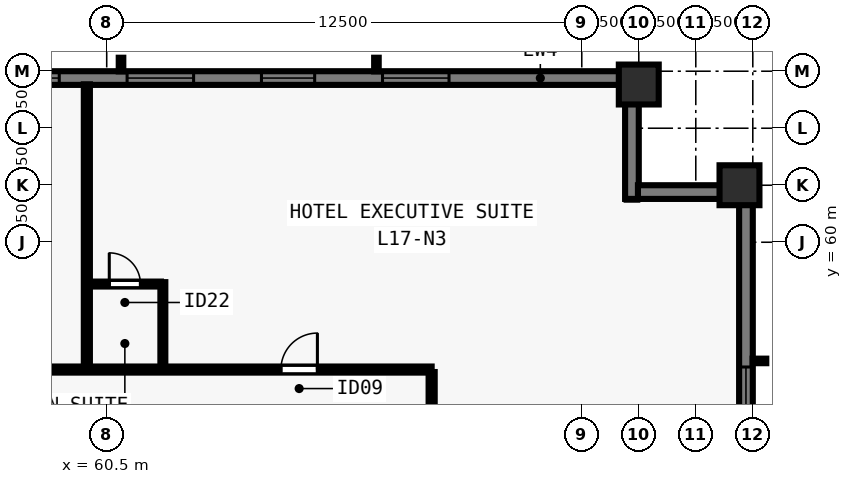
"""IFC4 building model, lengths in metres.
Left out: names, types, materials, properties, quantities, classifications, styles, units other than length and angle.
Written with IfcOpenShell. Run it as: python <this file> out.ifc"""

import sys

from ifc_helpers import new_model, si_unit, direction, frame, frame_2d, origin, origin_2d, place, context, subcontext, project, spatial, rectangle, extrude, element, fill, save


model = new_model("IFC4")
c1 = context("Model", 3, precision=1e-05, world=origin(), true_north=direction((0.0, 1.0)))
c2 = subcontext(c1, "Body", "Model", "MODEL_VIEW")
j1 = project(units=[si_unit("LENGTHUNIT", "METRE"), si_unit("PLANEANGLEUNIT", "RADIAN")], contexts=[c1])
p1 = place(None, origin())
s1 = spatial("IfcSite", under=j1, at=p1, CompositionType="ELEMENT")
p2 = place(p1, origin())
s2 = spatial("IfcBuilding", under=s1, at=p2, CompositionType="ELEMENT")
p3 = place(p2, frame((0.0, 0.0, 65.5)))
s3 = spatial("IfcBuildingStorey", under=s2, at=p3, CompositionType="ELEMENT", Elevation=65.5)
for number, where, z_axis, x_axis in (
    (1, (77.15, 61.5, 0.0), (0.0, 0.0, 1.0), (0.0, 1.0, 0.0)),
    (2, (74.5, 64.15, 0.0), (0.0, 0.0, 1.0), (1.0, 0.0, 0.0)),
):
    element("IfcColumn", number, at=place(p3, frame(where, z_axis=z_axis, x_axis=x_axis)), inside=s3, PredefinedType="COLUMN", context=c2, shape_type="SweptSolid", body=[
        extrude(rectangle(XDim=1.05, YDim=1.05, at=origin_2d()), origin(), (0.0, 0.0, 1.0), 3.5),
    ])
p4 = place(p3, frame((29.5, 64.32, 0.0), z_axis=(0.0, 0.0, 1.0), x_axis=(1.0, 0.0, 0.0)))
e3 = element("IfcWall", 3, at=p4, inside=s3, PredefinedType="SOLIDWALL", context=c2, shape_type="SweptSolid", body=[
    extrude(rectangle(XDim=44.662, YDim=0.36, at=frame_2d((22.331, 0.0))), origin(), (0.0, 0.0, 1.0), 3.28),
])
p5 = place(p4, frame((4.655, 0.0, 0.8)))
e4 = element("IfcOpeningElement", 4, at=p5, cuts=e3, PredefinedType="OPENING", context=c2, shape_type="SweptSolid", body=[
    extrude(rectangle(XDim=1.75, YDim=1.544, at=frame_2d((0.875, 0.772))), frame((0.0, 0.19, 0.0), z_axis=(0.0, -1.0, 0.0), x_axis=(1.0, 0.0, 0.0)), (0.0, 0.0, 1.0), 0.38),
])
p6 = place(p4, frame((8.19, 0.0, 0.8)))
e5 = element("IfcOpeningElement", 5, at=p6, cuts=e3, PredefinedType="OPENING", context=c2, shape_type="SweptSolid", body=[
    extrude(rectangle(XDim=1.4, YDim=1.544, at=frame_2d((0.7, 0.772))), frame((0.0, 0.19, 0.0), z_axis=(0.0, -1.0, 0.0), x_axis=(1.0, 0.0, 0.0)), (0.0, 0.0, 1.0), 0.38),
])
p7 = place(p4, frame((11.375, 0.0, 0.8)))
e6 = element("IfcOpeningElement", 6, at=p7, cuts=e3, PredefinedType="OPENING", context=c2, shape_type="SweptSolid", body=[
    extrude(rectangle(XDim=1.75, YDim=1.544, at=frame_2d((0.875, 0.772))), frame((0.0, 0.19, 0.0), z_axis=(0.0, -1.0, 0.0), x_axis=(1.0, 0.0, 0.0)), (0.0, 0.0, 1.0), 0.38),
])
p8 = place(p4, frame((15.361, 0.0, 0.8)))
e7 = element("IfcOpeningElement", 7, at=p8, cuts=e3, PredefinedType="OPENING", context=c2, shape_type="SweptSolid", body=[
    extrude(rectangle(XDim=1.4, YDim=1.544, at=frame_2d((0.7, 0.772))), frame((0.0, 0.19, 0.0), z_axis=(0.0, -1.0, 0.0), x_axis=(1.0, 0.0, 0.0)), (0.0, 0.0, 1.0), 0.38),
])
p9 = place(p4, frame((18.546, 0.0, 0.8)))
e8 = element("IfcOpeningElement", 8, at=p9, cuts=e3, PredefinedType="OPENING", context=c2, shape_type="SweptSolid", body=[
    extrude(rectangle(XDim=1.75, YDim=1.544, at=frame_2d((0.875, 0.772))), frame((0.0, 0.19, 0.0), z_axis=(0.0, -1.0, 0.0), x_axis=(1.0, 0.0, 0.0)), (0.0, 0.0, 1.0), 0.38),
])
p10 = place(p4, frame((21.631, 0.0, 0.8)))
e9 = element("IfcOpeningElement", 9, at=p10, cuts=e3, PredefinedType="OPENING", context=c2, shape_type="SweptSolid", body=[
    extrude(rectangle(XDim=1.4, YDim=1.544, at=frame_2d((0.7, 0.772))), frame((0.0, 0.19, 0.0), z_axis=(0.0, -1.0, 0.0), x_axis=(1.0, 0.0, 0.0)), (0.0, 0.0, 1.0), 0.38),
])
p11 = place(p4, frame((24.366, 0.0, 0.8)))
e10 = element("IfcOpeningElement", 10, at=p11, cuts=e3, PredefinedType="OPENING", context=c2, shape_type="SweptSolid", body=[
    extrude(rectangle(XDim=1.75, YDim=1.544, at=frame_2d((0.875, 0.772))), frame((0.0, 0.19, 0.0), z_axis=(0.0, -1.0, 0.0), x_axis=(1.0, 0.0, 0.0)), (0.0, 0.0, 1.0), 0.38),
])
p12 = place(p4, frame((28.351, 0.0, 0.8)))
e11 = element("IfcOpeningElement", 11, at=p12, cuts=e3, PredefinedType="OPENING", context=c2, shape_type="SweptSolid", body=[
    extrude(rectangle(XDim=1.4, YDim=1.544, at=frame_2d((0.7, 0.772))), frame((0.0, 0.19, 0.0), z_axis=(0.0, -1.0, 0.0), x_axis=(1.0, 0.0, 0.0)), (0.0, 0.0, 1.0), 0.38),
])
p13 = place(p4, frame((31.537, 0.0, 0.8)))
e12 = element("IfcOpeningElement", 12, at=p13, cuts=e3, PredefinedType="OPENING", context=c2, shape_type="SweptSolid", body=[
    extrude(rectangle(XDim=1.75, YDim=1.544, at=frame_2d((0.875, 0.772))), frame((0.0, 0.19, 0.0), z_axis=(0.0, -1.0, 0.0), x_axis=(1.0, 0.0, 0.0)), (0.0, 0.0, 1.0), 0.38),
])
p14 = place(p4, frame((35.072, 0.0, 0.8)))
e13 = element("IfcOpeningElement", 13, at=p14, cuts=e3, PredefinedType="OPENING", context=c2, shape_type="SweptSolid", body=[
    extrude(rectangle(XDim=1.4, YDim=1.544, at=frame_2d((0.7, 0.772))), frame((0.0, 0.19, 0.0), z_axis=(0.0, -1.0, 0.0), x_axis=(1.0, 0.0, 0.0)), (0.0, 0.0, 1.0), 0.38),
])
p15 = place(p4, frame((38.257, 0.0, 0.8)))
e14 = element("IfcOpeningElement", 14, at=p15, cuts=e3, PredefinedType="OPENING", context=c2, shape_type="SweptSolid", body=[
    extrude(rectangle(XDim=1.75, YDim=1.544, at=frame_2d((0.875, 0.772))), frame((0.0, 0.19, 0.0), z_axis=(0.0, -1.0, 0.0), x_axis=(1.0, 0.0, 0.0)), (0.0, 0.0, 1.0), 0.38),
])
p16 = place(p3, frame((74.32, 64.5, 0.0), z_axis=(0.0, 0.0, 1.0), x_axis=(0.0, -1.0, 0.0)))
e15 = element("IfcWall", 15, at=p16, inside=s3, PredefinedType="SOLIDWALL", context=c2, shape_type="SweptSolid", body=[
    extrude(rectangle(XDim=3.36, YDim=0.36, at=frame_2d((1.68, 0.0))), origin(), (0.0, 0.0, 1.0), 3.28),
])
p17 = place(p3, frame((74.478, 61.32, 0.0), z_axis=(0.0, 0.0, 1.0), x_axis=(1.0, 0.0, 0.0)))
e16 = element("IfcWall", 16, at=p17, inside=s3, PredefinedType="SOLIDWALL", context=c2, shape_type="SweptSolid", body=[
    extrude(rectangle(XDim=2.684, YDim=0.36, at=frame_2d((1.342, 0.0))), origin(), (0.0, 0.0, 1.0), 3.28),
])
p18 = place(p3, frame((77.32, 61.5, 0.0), z_axis=(0.0, 0.0, 1.0), x_axis=(0.0, -1.0, 0.0)))
e17 = element("IfcWall", 17, at=p18, inside=s3, PredefinedType="SOLIDWALL", context=c2, shape_type="SweptSolid", body=[
    extrude(rectangle(XDim=19.562, YDim=0.36, at=frame_2d((9.781, 0.0))), origin(), (0.0, 0.0, 1.0), 3.28),
])
p19 = place(p18, frame((4.783, 0.0, 0.8)))
e18 = element("IfcOpeningElement", 18, at=p19, cuts=e17, PredefinedType="OPENING", context=c2, shape_type="SweptSolid", body=[
    extrude(rectangle(XDim=1.75, YDim=1.544, at=frame_2d((0.875, 0.772))), frame((0.0, 0.19, 0.0), z_axis=(0.0, -1.0, 0.0), x_axis=(1.0, 0.0, 0.0)), (0.0, 0.0, 1.0), 0.38),
])
p20 = place(p18, frame((8.573, 0.0, 0.8)))
e19 = element("IfcOpeningElement", 19, at=p20, cuts=e17, PredefinedType="OPENING", context=c2, shape_type="SweptSolid", body=[
    extrude(rectangle(XDim=1.4, YDim=1.544, at=frame_2d((0.7, 0.772))), frame((0.0, 0.19, 0.0), z_axis=(0.0, -1.0, 0.0), x_axis=(1.0, 0.0, 0.0)), (0.0, 0.0, 1.0), 0.38),
])
p21 = place(p18, frame((12.014, 0.0, 0.8)))
e20 = element("IfcOpeningElement", 20, at=p21, cuts=e17, PredefinedType="OPENING", context=c2, shape_type="SweptSolid", body=[
    extrude(rectangle(XDim=1.75, YDim=1.544, at=frame_2d((0.875, 0.772))), frame((0.0, 0.19, 0.0), z_axis=(0.0, -1.0, 0.0), x_axis=(1.0, 0.0, 0.0)), (0.0, 0.0, 1.0), 0.38),
])
p22 = place(p18, frame((15.354, 0.0, 0.8)))
e21 = element("IfcOpeningElement", 21, at=p22, cuts=e17, PredefinedType="OPENING", context=c2, shape_type="SweptSolid", body=[
    extrude(rectangle(XDim=1.4, YDim=1.544, at=frame_2d((0.7, 0.772))), frame((0.0, 0.19, 0.0), z_axis=(0.0, -1.0, 0.0), x_axis=(1.0, 0.0, 0.0)), (0.0, 0.0, 1.0), 0.38),
])
p23 = place(p3, frame((34.95, 56.65, 0.0), z_axis=(0.0, 0.0, 1.0), x_axis=(1.0, 0.0, 0.0)))
e22 = element("IfcWall", 22, at=p23, inside=s3, PredefinedType="PARTITIONING", context=c2, shape_type="SweptSolid", body=[
    extrude(rectangle(XDim=34.1, YDim=0.16, at=frame_2d((17.05, 0.0))), origin(), (0.0, 0.0, 1.0), 3.28),
])
p24 = place(p23, frame((4.166, 0.0, 0.0)))
e23 = element("IfcOpeningElement", 23, at=p24, cuts=e22, PredefinedType="OPENING", context=c2, shape_type="SweptSolid", body=[
    extrude(rectangle(XDim=0.96, YDim=2.15, at=frame_2d((0.48, 1.075))), frame((0.0, 0.09, 0.0), z_axis=(0.0, -1.0, 0.0), x_axis=(1.0, 0.0, 0.0)), (0.0, 0.0, 1.0), 0.18),
])
p25 = place(p23, frame((17.73, 0.0, 0.0)))
e24 = element("IfcOpeningElement", 24, at=p25, cuts=e22, PredefinedType="OPENING", context=c2, shape_type="SweptSolid", body=[
    extrude(rectangle(XDim=0.96, YDim=2.15, at=frame_2d((0.48, 1.075))), frame((0.0, 0.09, 0.0), z_axis=(0.0, -1.0, 0.0), x_axis=(1.0, 0.0, 0.0)), (0.0, 0.0, 1.0), 0.18),
])
p26 = place(p23, frame((30.134, 0.0, 0.0)))
e25 = element("IfcOpeningElement", 25, at=p26, cuts=e22, PredefinedType="OPENING", context=c2, shape_type="SweptSolid", body=[
    extrude(rectangle(XDim=0.96, YDim=2.15, at=frame_2d((0.48, 1.075))), frame((0.0, 0.09, 0.0), z_axis=(0.0, -1.0, 0.0), x_axis=(1.0, 0.0, 0.0)), (0.0, 0.0, 1.0), 0.18),
])
p27 = place(p3, frame((69.05, 21.415, 0.0), z_axis=(0.0, 0.0, 1.0), x_axis=(0.0, 1.0, 0.0)))
e26 = element("IfcWall", 26, at=p27, inside=s3, PredefinedType="PARTITIONING", context=c2, shape_type="SweptSolid", body=[
    extrude(rectangle(XDim=35.17, YDim=0.16, at=frame_2d((17.585, 0.0))), origin(), (0.0, 0.0, 1.0), 3.28),
])
p28 = place(p27, frame((9.746, 0.0, 0.0)))
e27 = element("IfcOpeningElement", 27, at=p28, cuts=e26, PredefinedType="OPENING", context=c2, shape_type="SweptSolid", body=[
    extrude(rectangle(XDim=0.96, YDim=2.15, at=frame_2d((0.48, 1.075))), frame((0.0, 0.09, 0.0), z_axis=(0.0, -1.0, 0.0), x_axis=(1.0, 0.0, 0.0)), (0.0, 0.0, 1.0), 0.18),
])
p29 = place(p27, frame((27.146, 0.0, 0.0)))
e28 = element("IfcOpeningElement", 28, at=p29, cuts=e26, PredefinedType="OPENING", context=c2, shape_type="SweptSolid", body=[
    extrude(rectangle(XDim=0.96, YDim=2.15, at=frame_2d((0.48, 1.075))), frame((0.0, 0.09, 0.0), z_axis=(0.0, -1.0, 0.0), x_axis=(1.0, 0.0, 0.0)), (0.0, 0.0, 1.0), 0.18),
])
p30 = place(p3, frame((59.978, 56.715, 0.0), z_axis=(0.0, 0.0, 1.0), x_axis=(0.0, 1.0, 0.0)))
e29 = element("IfcWall", 29, at=p30, inside=s3, PredefinedType="PARTITIONING", context=c2, shape_type="SweptSolid", body=[
    extrude(rectangle(XDim=7.44, YDim=0.16, at=frame_2d((3.72, 0.0))), origin(), (0.0, 0.0, 1.0), 3.28),
])
p31 = place(p3, frame((61.978, 56.715, 0.0), z_axis=(0.0, 0.0, 1.0), x_axis=(0.0, 1.0, 0.0)))
e30 = element("IfcWall", 30, at=p31, inside=s3, PredefinedType="PLUMBINGWALL", context=c2, shape_type="SweptSolid", body=[
    extrude(rectangle(XDim=2.235, YDim=0.13, at=frame_2d((1.117, 0.0))), origin(), (0.0, 0.0, 1.0), 3.28),
])
p32 = place(p3, frame((60.042, 58.9, 0.0), z_axis=(0.0, 0.0, 1.0), x_axis=(1.0, 0.0, 0.0)))
e31 = element("IfcWall", 31, at=p32, inside=s3, PredefinedType="PLUMBINGWALL", context=c2, shape_type="SweptSolid", body=[
    extrude(rectangle(XDim=1.885, YDim=0.13, at=frame_2d((0.942, 0.0))), origin(), (0.0, 0.0, 1.0), 3.28),
])
p33 = place(p32, frame((0.525, 0.0, 0.0)))
e32 = element("IfcOpeningElement", 32, at=p33, cuts=e31, PredefinedType="OPENING", context=c2, shape_type="SweptSolid", body=[
    extrude(rectangle(XDim=0.82, YDim=2.1, at=frame_2d((0.41, 1.05))), frame((0.0, 0.075, 0.0), z_axis=(0.0, -1.0, 0.0), x_axis=(1.0, 0.0, 0.0)), (0.0, 0.0, 1.0), 0.15),
])
p34 = place(p12, origin())
e33 = element("IfcWindow", 33, at=p34, inside=s3, PartitioningType="SINGLE_PANEL", PredefinedType="WINDOW", context=c2, shape_type="SweptSolid", body=[
    extrude(rectangle(XDim=1.4, YDim=1.544, at=frame_2d((0.7, 0.772))), frame((0.0, -0.05, 0.0), z_axis=(0.0, -1.0, 0.0), x_axis=(1.0, 0.0, 0.0)), (0.0, 0.0, 1.0), 0.06),
])
fill(e11, e33)
p35 = place(p13, origin())
e34 = element("IfcWindow", 34, at=p35, inside=s3, PartitioningType="SINGLE_PANEL", PredefinedType="WINDOW", context=c2, shape_type="SweptSolid", body=[
    extrude(rectangle(XDim=1.75, YDim=1.544, at=frame_2d((0.875, 0.772))), frame((0.0, -0.05, 0.0), z_axis=(0.0, -1.0, 0.0), x_axis=(1.0, 0.0, 0.0)), (0.0, 0.0, 1.0), 0.06),
])
fill(e12, e34)
p36 = place(p14, origin())
e35 = element("IfcWindow", 35, at=p36, inside=s3, PartitioningType="SINGLE_PANEL", PredefinedType="WINDOW", context=c2, shape_type="SweptSolid", body=[
    extrude(rectangle(XDim=1.4, YDim=1.544, at=frame_2d((0.7, 0.772))), frame((0.0, -0.05, 0.0), z_axis=(0.0, -1.0, 0.0), x_axis=(1.0, 0.0, 0.0)), (0.0, 0.0, 1.0), 0.06),
])
fill(e13, e35)
p37 = place(p15, origin())
e36 = element("IfcWindow", 36, at=p37, inside=s3, PartitioningType="SINGLE_PANEL", PredefinedType="WINDOW", context=c2, shape_type="SweptSolid", body=[
    extrude(rectangle(XDim=1.75, YDim=1.544, at=frame_2d((0.875, 0.772))), frame((0.0, -0.05, 0.0), z_axis=(0.0, -1.0, 0.0), x_axis=(1.0, 0.0, 0.0)), (0.0, 0.0, 1.0), 0.06),
])
fill(e14, e36)
p38 = place(p19, origin())
e37 = element("IfcWindow", 37, at=p38, inside=s3, PartitioningType="SINGLE_PANEL", PredefinedType="WINDOW", context=c2, shape_type="SweptSolid", body=[
    extrude(rectangle(XDim=1.75, YDim=1.544, at=frame_2d((0.875, 0.772))), frame((0.0, -0.05, 0.0), z_axis=(0.0, -1.0, 0.0), x_axis=(1.0, 0.0, 0.0)), (0.0, 0.0, 1.0), 0.06),
])
fill(e18, e37)
p39 = place(p33, origin())
e38 = element("IfcDoor", 38, at=p39, inside=s3, OperationType="SINGLE_SWING_LEFT", PredefinedType="DOOR", context=c2, shape_type="SweptSolid", body=[
    extrude(rectangle(XDim=0.82, YDim=2.1, at=frame_2d((0.41, 1.05))), frame((0.0, 0.025, 0.0), z_axis=(0.0, -1.0, 0.0), x_axis=(1.0, 0.0, 0.0)), (0.0, 0.0, 1.0), 0.05),
])
fill(e32, e38)
p40 = place(p26, origin())
e39 = element("IfcDoor", 39, at=p40, inside=s3, OperationType="SINGLE_SWING_RIGHT", PredefinedType="DOOR", context=c2, shape_type="SweptSolid", body=[
    extrude(rectangle(XDim=0.96, YDim=2.15, at=frame_2d((0.48, 1.075))), frame((0.0, 0.025, 0.0), z_axis=(0.0, -1.0, 0.0), x_axis=(1.0, 0.0, 0.0)), (0.0, 0.0, 1.0), 0.05),
])
fill(e25, e39)
save(model, sys.argv[1])
